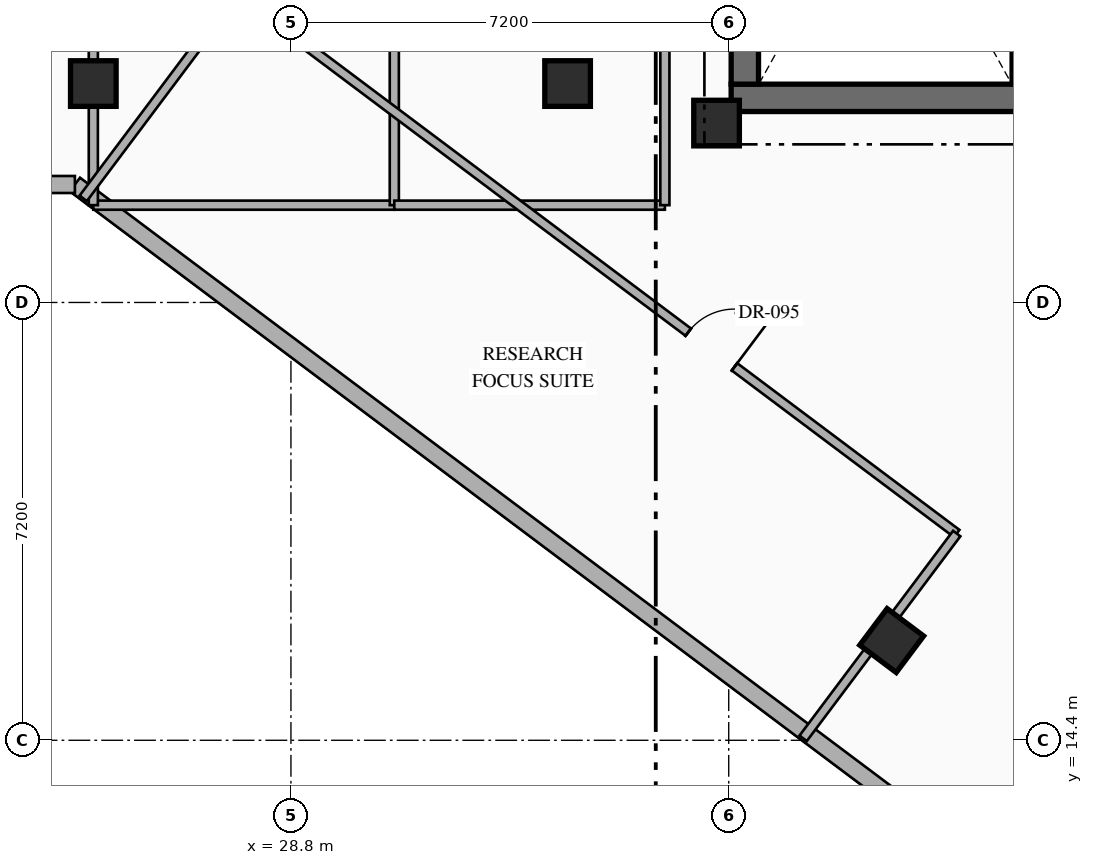
"""IFC4 building model, lengths in metres.
Left out: names, types, materials, properties, quantities, classifications, styles, units other than length and angle.
Written with IfcOpenShell. Run it as: python <this file> out.ifc"""

import sys

from ifc_helpers import new_model, si_unit, direction, frame, frame_2d, origin, origin_2d, place, context, subcontext, project, spatial, rectangle, hollow_rectangle, extrude, element, fill, save


model = new_model("IFC4")
c1 = context("Model", 3, precision=1e-05, world=origin(), true_north=direction((0.0, 1.0)))
c2 = subcontext(c1, "Body", "Model", "MODEL_VIEW")
j1 = project(units=[si_unit("LENGTHUNIT", "METRE"), si_unit("PLANEANGLEUNIT", "RADIAN")], contexts=[c1])
p1 = place(None, origin())
s1 = spatial("IfcSite", under=j1, at=p1, CompositionType="ELEMENT")
p2 = place(p1, origin())
s2 = spatial("IfcBuilding", under=s1, at=p2, CompositionType="ELEMENT")
p3 = place(p2, frame((0.0, 0.0, 195.15)))
s3 = spatial("IfcBuildingStorey", under=s2, at=p3, CompositionType="ELEMENT", Elevation=195.15)
p4 = place(p3, frame((36.04, 24.965, 0.0), z_axis=(0.0, 0.0, 1.0), x_axis=(1.0, 0.0, 0.0)))
e1 = element("IfcWall", 1, at=p4, inside=s3, PredefinedType="SHEAR", context=c2, shape_type="SweptSolid", body=[
    extrude(rectangle(XDim=7.46, YDim=0.45, at=frame_2d((3.73, 0.0))), origin(), (0.0, 0.0, 1.0), 3.6),
])
p5 = place(p3, frame((36.265, 25.19, 0.0), z_axis=(0.0, 0.0, 1.0), x_axis=(0.0, 1.0, 0.0)))
e2 = element("IfcWall", 2, at=p5, inside=s3, PredefinedType="SHEAR", context=c2, shape_type="SweptSolid", body=[
    extrude(rectangle(XDim=9.48, YDim=0.45, at=frame_2d((4.74, 0.0))), origin(), (0.0, 0.0, 1.0), 3.6),
])
p6 = place(p3, frame((40.81, 25.19, 0.0), z_axis=(0.0, 0.0, 1.0), x_axis=(0.0, 1.0, 0.0)))
e3 = element("IfcWall", 3, at=p6, inside=s3, PredefinedType="SHEAR", context=c2, shape_type="SweptSolid", body=[
    extrude(rectangle(XDim=9.48, YDim=0.3, at=frame_2d((4.74, 0.0))), origin(), (0.0, 0.0, 1.0), 3.6),
])
for number, where, z_axis, x_axis in (
    (4, (35.8, 24.55, 0.0), (0.0, 0.0, 1.0), (1.0, 0.0, 0.0)),
    (5, (25.55, 25.2, 0.0), (0.0, 0.0, 1.0), (1.0, 0.0, 0.0)),
    (6, (33.35, 25.2, 0.0), (0.0, 0.0, 1.0), (1.0, 0.0, 0.0)),
    (7, (38.68, 16.04, 0.0), (0.0, 0.0, 1.0), (0.8, -0.6, 0.0)),
):
    element("IfcColumn", number, at=place(p3, frame(where, z_axis=z_axis, x_axis=x_axis)), inside=s3, PredefinedType="COLUMN", context=c2, shape_type="SweptSolid", body=[
        extrude(hollow_rectangle(XDim=0.75, YDim=0.75, WallThickness=0.028, at=origin_2d()), origin(), (0.0, 0.0, 1.0), 3.6),
    ])
p7 = place(p3, frame((44.918, 8.787, 0.0), z_axis=(0.0, 0.0, 1.0), x_axis=(-0.800004765927, 0.599993645378, 0.0)))
e8 = element("IfcWall", 8, at=p7, inside=s3, PredefinedType="STANDARD", context=c2, shape_type="SweptSolid", body=[
    extrude(rectangle(XDim=24.588, YDim=0.28, at=frame_2d((12.294, 0.0))), origin(), (0.0, 0.0, 1.0), 3.35),
])
p8 = place(p3, frame((25.247, 23.54, 0.0), z_axis=(0.0, 0.0, 1.0), x_axis=(-1.0, 0.0, 0.0)))
e9 = element("IfcWall", 9, at=p8, inside=s3, PredefinedType="STANDARD", context=c2, shape_type="SweptSolid", body=[
    extrude(rectangle(XDim=4.789, YDim=0.28, at=frame_2d((2.395, 0.0))), origin(), (0.0, 0.0, 1.0), 3.35),
])
p9 = place(p3, frame((25.55, 23.2, 0.0), z_axis=(0.0, 0.0, 1.0), x_axis=(1.0, 0.0, 0.0)))
e10 = element("IfcWall", 10, at=p9, inside=s3, PredefinedType="PARTITIONING", context=c2, shape_type="SweptSolid", body=[
    extrude(rectangle(XDim=4.95, YDim=0.15, at=frame_2d((2.475, 0.0))), origin(), (0.0, 0.0, 1.0), 3.35),
])
p10 = place(p3, frame((25.55, 23.2, 0.0), z_axis=(0.0, 0.0, 1.0), x_axis=(0.0, 1.0, 0.0)))
e11 = element("IfcWall", 11, at=p10, inside=s3, PredefinedType="PARTITIONING", context=c2, shape_type="SweptSolid", body=[
    extrude(rectangle(XDim=7.15, YDim=0.15, at=frame_2d((3.575, 0.0))), origin(), (0.0, 0.0, 1.0), 2.757),
])
p11 = place(p3, frame((30.5, 23.2, 0.0), z_axis=(0.0, 0.0, 1.0), x_axis=(0.0, 1.0, 0.0)))
e12 = element("IfcWall", 12, at=p11, inside=s3, PredefinedType="PARTITIONING", context=c2, shape_type="SweptSolid", body=[
    extrude(rectangle(XDim=7.15, YDim=0.15, at=frame_2d((3.575, 0.0))), origin(), (0.0, 0.0, 1.0), 3.35),
])
p12 = place(p3, frame((30.5, 23.2, 0.0), z_axis=(0.0, 0.0, 1.0), x_axis=(1.0, 0.0, 0.0)))
e13 = element("IfcWall", 13, at=p12, inside=s3, PredefinedType="PARTITIONING", context=c2, shape_type="SweptSolid", body=[
    extrude(rectangle(XDim=4.45, YDim=0.15, at=frame_2d((2.225, 0.0))), origin(), (0.0, 0.0, 1.0), 3.35),
])
p13 = place(p3, frame((34.95, 23.2, 0.0), z_axis=(0.0, 0.0, 1.0), x_axis=(0.0, 1.0, 0.0)))
e14 = element("IfcWall", 14, at=p13, inside=s3, PredefinedType="PARTITIONING", context=c2, shape_type="SweptSolid", body=[
    extrude(rectangle(XDim=7.15, YDim=0.15, at=frame_2d((3.575, 0.0))), origin(), (0.0, 0.0, 1.0), 3.35),
])
p14 = place(p3, frame((27.91, 26.68, 0.0), z_axis=(0.0, 0.0, 1.0), x_axis=(0.800005938517, -0.599992081896, 0.0)))
e15 = element("IfcWall", 15, at=p14, inside=s3, PredefinedType="PARTITIONING", context=c2, shape_type="SweptSolid", body=[
    extrude(rectangle(XDim=14.8, YDim=0.15, at=frame_2d((7.4, 0.0))), origin(), (0.0, 0.0, 1.0), 3.35),
])
p15 = place(p14, frame((9.281, 0.0, 0.0)))
e16 = element("IfcOpeningElement", 16, at=p15, cuts=e15, PredefinedType="OPENING", context=c2, shape_type="SweptSolid", body=[
    extrude(rectangle(XDim=0.95, YDim=2.15, at=frame_2d((0.475, 1.075))), frame((0.0, 0.085, 0.0), z_axis=(0.0, -1.0, 0.0), x_axis=(1.0, 0.0, 0.0)), (0.0, 0.0, 1.0), 0.17),
])
p16 = place(p3, frame((25.384, 23.312, 0.0), z_axis=(0.0, 0.0, 1.0), x_axis=(0.599990721155, 0.80000695905, 0.0)))
e17 = element("IfcWall", 17, at=p16, inside=s3, PredefinedType="PARTITIONING", context=c2, shape_type="SweptSolid", body=[
    extrude(rectangle(XDim=4.21, YDim=0.15, at=frame_2d((2.105, 0.0))), origin(), (0.0, 0.0, 1.0), 3.35),
])
p17 = place(p3, frame((37.224, 14.432, 0.0), z_axis=(0.0, 0.0, 1.0), x_axis=(0.599962885857, 0.800027834262, 0.0)))
e18 = element("IfcWall", 18, at=p17, inside=s3, PredefinedType="PARTITIONING", context=c2, shape_type="SweptSolid", body=[
    extrude(rectangle(XDim=4.21, YDim=0.15, at=frame_2d((2.105, 0.0))), origin(), (0.0, 0.0, 1.0), 2.757),
])
p18 = place(p15, origin())
e19 = element("IfcDoor", 19, at=p18, inside=s3, OperationType="SINGLE_SWING_RIGHT", PredefinedType="DOOR", context=c2, shape_type="SweptSolid", body=[
    extrude(rectangle(XDim=0.95, YDim=2.15, at=frame_2d((0.475, 1.075))), frame((0.0, 0.025, 0.0), z_axis=(0.0, -1.0, 0.0), x_axis=(1.0, 0.0, 0.0)), (0.0, 0.0, 1.0), 0.05),
])
fill(e16, e19)
save(model, sys.argv[1])
